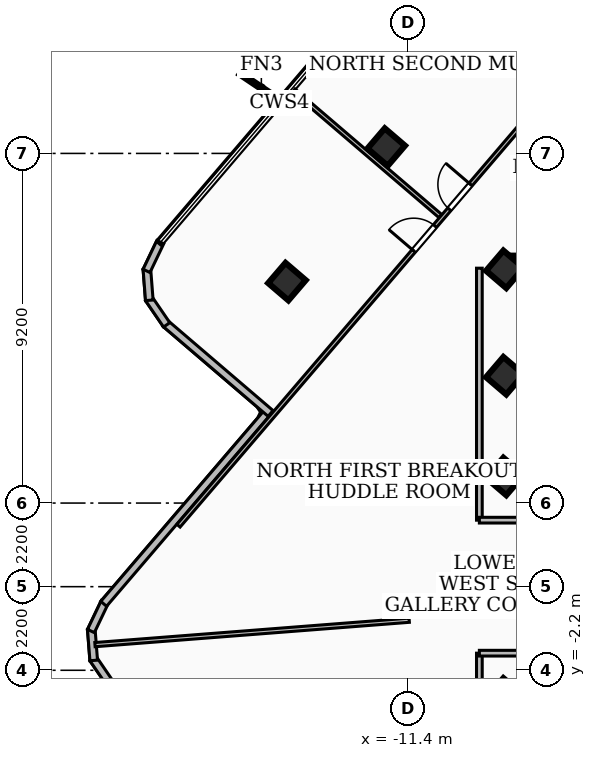
"""IFC4 building model, lengths in metres.
Left out: names, types, materials, properties, quantities, classifications, styles, units other than length and angle.
Written with IfcOpenShell. Run it as: python <this file> out.ifc"""

import sys

from ifc_helpers import new_model, si_unit, direction, frame, frame_2d, origin, origin_2d, place, context, subcontext, project, spatial, rectangle, extrude, element, fill, save


model = new_model("IFC4")
c1 = context("Model", 3, precision=1e-05, world=origin(), true_north=direction((0.0, 1.0)))
c2 = subcontext(c1, "Body", "Model", "MODEL_VIEW")
j1 = project(units=[si_unit("LENGTHUNIT", "METRE"), si_unit("PLANEANGLEUNIT", "RADIAN")], contexts=[c1])
p1 = place(None, origin())
s1 = spatial("IfcSite", under=j1, at=p1, CompositionType="ELEMENT")
p2 = place(p1, origin())
s2 = spatial("IfcBuilding", under=s1, at=p2, CompositionType="ELEMENT")
p3 = place(p2, frame((0.0, 0.0, 254.34)))
s3 = spatial("IfcBuildingStorey", under=s2, at=p3, CompositionType="ELEMENT", Elevation=254.34)
p4 = place(p3, frame((-8.78, 8.51, 0.0), z_axis=(0.0, 0.0, 1.0), x_axis=(1.0, 0.0, 0.0)))
e1 = element("IfcWall", 1, at=p4, inside=s3, PredefinedType="SHEAR", context=c2, shape_type="SweptSolid", body=[
    extrude(rectangle(XDim=17.56, YDim=0.4, at=frame_2d((8.78, 0.0))), origin(), (0.0, 0.0, 1.0), 3.16),
])
for number, where, z_axis, x_axis in (
    (2, (-8.85, -2.9, 0.0), (0.0, 0.0, 1.0), (0.65, 0.76, 0.0)),
    (3, (-8.85, 2.9, 0.0), (0.0, 0.0, 1.0), (0.65, 0.76, 0.0)),
    (4, (-8.85, 5.55, 0.0), (0.0, 0.0, 1.0), (0.65, 0.76, 0.0)),
    (5, (-8.85, 8.35, 0.0), (0.0, 0.0, 1.0), (0.65, 0.76, 0.0)),
    (6, (-11.971, 11.566, 0.0), (0.0, 0.0, 1.0), (0.65, 0.76, 0.0)),
    (7, (-14.583, 8.026, 0.0), (0.0, 0.0, 1.0), (0.65, 0.76, 0.0)),
):
    element("IfcColumn", number, at=place(p3, frame(where, z_axis=z_axis, x_axis=x_axis)), inside=s3, PredefinedType="COLUMN", context=c2, shape_type="SweptSolid", body=[
        extrude(rectangle(XDim=0.7, YDim=0.7, at=origin_2d()), origin(), (0.0, 0.0, 1.0), 3.42),
    ])
p5 = place(p3, frame((-19.21, -2.587, 0.0), z_axis=(0.0, 0.0, 1.0), x_axis=(-0.565268121329, 0.824907237821, 0.0)))
e8 = element("IfcWall", 8, at=p5, inside=s3, PredefinedType="SOLIDWALL", context=c2, shape_type="SweptSolid", body=[
    extrude(rectangle(XDim=0.839, YDim=0.2, at=frame_2d((0.419, 0.0))), origin(), (0.0, 0.0, 1.0), 3.16),
])
p6 = place(p3, frame((-19.668, -1.941, 0.0), z_axis=(0.0, 0.0, 1.0), x_axis=(-0.077579558977, 0.996986164412, 0.0)))
e9 = element("IfcWall", 9, at=p6, inside=s3, PredefinedType="SOLIDWALL", context=c2, shape_type="SweptSolid", body=[
    extrude(rectangle(XDim=0.824, YDim=0.2, at=frame_2d((0.412, 0.0))), origin(), (0.0, 0.0, 1.0), 3.16),
])
p7 = place(p3, frame((-19.741, -1.167, 0.0), z_axis=(0.0, 0.0, 1.0), x_axis=(0.430982405796, 0.902360330408, 0.0)))
e10 = element("IfcWall", 10, at=p7, inside=s3, PredefinedType="SOLIDWALL", context=c2, shape_type="SweptSolid", body=[
    extrude(rectangle(XDim=0.84, YDim=0.2, at=frame_2d((0.42, 0.0))), origin(), (0.0, 0.0, 1.0), 3.16),
])
p8 = place(p3, frame((-19.406, -0.451, 0.0), z_axis=(0.0, 0.0, 1.0), x_axis=(0.650185720357, 0.759775314842, 0.0)))
e11 = element("IfcWall", 11, at=p8, inside=s3, PredefinedType="SOLIDWALL", context=c2, shape_type="SweptSolid", body=[
    extrude(rectangle(XDim=6.741, YDim=0.2, at=frame_2d((3.371, 0.0))), origin(), (0.0, 0.0, 1.0), 3.16),
])
p9 = place(p3, frame((-15.014, 4.558, 0.0), z_axis=(0.0, 0.0, 1.0), x_axis=(-0.759781598798, 0.650178377161, 0.0)))
e12 = element("IfcWall", 12, at=p9, inside=s3, PredefinedType="SOLIDWALL", context=c2, shape_type="SweptSolid", body=[
    extrude(rectangle(XDim=3.642, YDim=0.2, at=frame_2d((1.821, 0.0))), origin(), (0.0, 0.0, 1.0), 3.16),
])
p10 = place(p3, frame((-17.748, 6.889, 0.0), z_axis=(0.0, 0.0, 1.0), x_axis=(-0.564140869434, 0.825678556967, 0.0)))
e13 = element("IfcWall", 13, at=p10, inside=s3, PredefinedType="SOLIDWALL", context=c2, shape_type="SweptSolid", body=[
    extrude(rectangle(XDim=0.838, YDim=0.2, at=frame_2d((0.419, 0.0))), origin(), (0.0, 0.0, 1.0), 3.16),
])
p11 = place(p3, frame((-18.205, 7.535, 0.0), z_axis=(0.0, 0.0, 1.0), x_axis=(-0.077579558977, 0.996986164412, 0.0)))
e14 = element("IfcWall", 14, at=p11, inside=s3, PredefinedType="SOLIDWALL", context=c2, shape_type="SweptSolid", body=[
    extrude(rectangle(XDim=0.824, YDim=0.2, at=frame_2d((0.412, 0.0))), origin(), (0.0, 0.0, 1.0), 3.16),
])
p12 = place(p3, frame((-18.278, 8.309, 0.0), z_axis=(0.0, 0.0, 1.0), x_axis=(0.431548166297, 0.902089895834, 0.0)))
e15 = element("IfcWall", 15, at=p12, inside=s3, PredefinedType="SOLIDWALL", context=c2, shape_type="SweptSolid", body=[
    extrude(rectangle(XDim=0.839, YDim=0.2, at=frame_2d((0.419, 0.0))), origin(), (0.0, 0.0, 1.0), 3.16),
])
p13 = place(p3, frame((-9.52, 1.75, 0.0), z_axis=(0.0, 0.0, 1.0), x_axis=(0.0, 1.0, 0.0)))
e16 = element("IfcWall", 16, at=p13, inside=s3, PredefinedType="PARTITIONING", context=c2, shape_type="SweptSolid", body=[
    extrude(rectangle(XDim=6.63, YDim=0.15, at=frame_2d((3.315, 0.0))), origin(), (0.0, 0.0, 1.0), 2.53),
])
p14 = place(p3, frame((-7.85, 1.75, 0.0), z_axis=(0.0, 0.0, 1.0), x_axis=(-1.0, 0.0, 0.0)))
e17 = element("IfcWall", 17, at=p14, inside=s3, PredefinedType="PARTITIONING", context=c2, shape_type="SweptSolid", body=[
    extrude(rectangle(XDim=1.67, YDim=0.15, at=frame_2d((0.835, 0.0))), origin(), (0.0, 0.0, 1.0), 2.39),
])
p15 = place(p3, frame((-9.52, -8.38, 0.0), z_axis=(0.0, 0.0, 1.0), x_axis=(0.0, 1.0, 0.0)))
e18 = element("IfcWall", 18, at=p15, inside=s3, PredefinedType="PARTITIONING", context=c2, shape_type="SweptSolid", body=[
    extrude(rectangle(XDim=6.63, YDim=0.15, at=frame_2d((3.315, 0.0))), origin(), (0.0, 0.0, 1.0), 3.16),
])
p16 = place(p3, frame((-7.85, -1.75, 0.0), z_axis=(0.0, 0.0, 1.0), x_axis=(-1.0, 0.0, 0.0)))
e19 = element("IfcWall", 19, at=p16, inside=s3, PredefinedType="PARTITIONING", context=c2, shape_type="SweptSolid", body=[
    extrude(rectangle(XDim=1.67, YDim=0.15, at=frame_2d((0.835, 0.0))), origin(), (0.0, 0.0, 1.0), 2.39),
])
p17 = place(p3, frame((-11.366, -0.883, 0.0), z_axis=(0.0, 0.0, 1.0), x_axis=(-0.997001087863, -0.077387536463, 0.0)))
e20 = element("IfcWall", 20, at=p17, inside=s3, PredefinedType="PARTITIONING", context=c2, shape_type="SweptSolid", body=[
    extrude(rectangle(XDim=8.294, YDim=0.11, at=frame_2d((4.147, 0.0))), origin(), (0.0, 0.0, 1.0), 3.16),
])
p18 = place(p3, frame((-10.544, 9.749, 0.0), z_axis=(0.0, 0.0, 1.0), x_axis=(-0.759849347966, 0.650099198889, 0.0)))
e21 = element("IfcWall", 21, at=p18, inside=s3, PredefinedType="PARTITIONING", context=c2, shape_type="SweptSolid", body=[
    extrude(rectangle(XDim=5.085, YDim=0.11, at=frame_2d((2.542, 0.0))), origin(), (0.0, 0.0, 1.0), 3.16),
])
p19 = place(p3, frame((-17.437, 1.604, 0.0), z_axis=(0.0, 0.0, 1.0), x_axis=(0.650265099033, 0.759707378522, 0.0)))
e22 = element("IfcWall", 22, at=p19, inside=s3, PredefinedType="PARTITIONING", context=c2, shape_type="SweptSolid", body=[
    extrude(rectangle(XDim=20.139, YDim=0.11, at=frame_2d((10.07, 0.0))), origin(), (0.0, 0.0, 1.0), 2.53),
])
p20 = place(p19, frame((10.959, 0.0, 0.0)))
e23 = element("IfcOpeningElement", 23, at=p20, cuts=e22, PredefinedType="OPENING", context=c2, shape_type="SweptSolid", body=[
    extrude(rectangle(XDim=0.86, YDim=2.04, at=frame_2d((0.43, 1.02))), frame((0.0, 0.065, 0.0), z_axis=(0.0, -1.0, 0.0), x_axis=(1.0, 0.0, 0.0)), (0.0, 0.0, 1.0), 0.13),
])
p21 = place(p19, frame((9.519, 0.0, 0.0)))
e24 = element("IfcOpeningElement", 24, at=p21, cuts=e22, PredefinedType="OPENING", context=c2, shape_type="SweptSolid", body=[
    extrude(rectangle(XDim=0.86, YDim=2.04, at=frame_2d((0.43, 1.02))), frame((0.0, 0.065, 0.0), z_axis=(0.0, -1.0, 0.0), x_axis=(1.0, 0.0, 0.0)), (0.0, 0.0, 1.0), 0.13),
])
p22 = place(p20, origin())
e25 = element("IfcDoor", 25, at=p22, inside=s3, OperationType="SINGLE_SWING_RIGHT", PredefinedType="DOOR", context=c2, shape_type="SweptSolid", body=[
    extrude(rectangle(XDim=0.86, YDim=2.04, at=frame_2d((0.43, 1.02))), frame((0.0, 0.025, 0.0), z_axis=(0.0, -1.0, 0.0), x_axis=(1.0, 0.0, 0.0)), (0.0, 0.0, 1.0), 0.05),
])
fill(e23, e25)
p23 = place(p21, origin())
e26 = element("IfcDoor", 26, at=p23, inside=s3, OperationType="SINGLE_SWING_LEFT", PredefinedType="DOOR", context=c2, shape_type="SweptSolid", body=[
    extrude(rectangle(XDim=0.86, YDim=2.04, at=frame_2d((0.43, 1.02))), frame((0.0, 0.025, 0.0), z_axis=(0.0, -1.0, 0.0), x_axis=(1.0, 0.0, 0.0)), (0.0, 0.0, 1.0), 0.05),
])
fill(e24, e26)
save(model, sys.argv[1])
